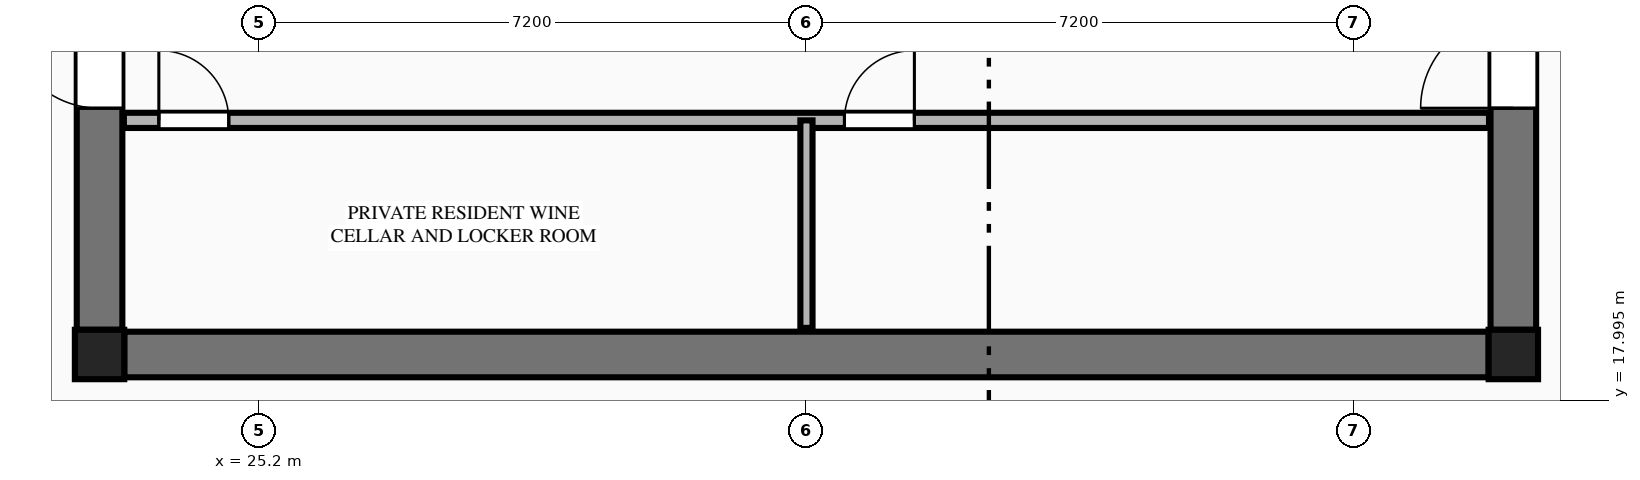
"""IFC4 building model, lengths in metres.
Left out: names, types, materials, properties, quantities, classifications, styles, units other than length and angle.
Written with IfcOpenShell. Run it as: python <this file> out.ifc"""

import sys

from ifc_helpers import new_model, si_unit, direction, frame, frame_2d, origin, origin_2d, place, context, subcontext, project, spatial, rectangle, extrude, element, fill, save


model = new_model("IFC4")
c1 = context("Model", 3, precision=1e-05, world=origin(), true_north=direction((0.0, 1.0)))
c2 = subcontext(c1, "Body", "Model", "MODEL_VIEW")
j1 = project(units=[si_unit("LENGTHUNIT", "METRE"), si_unit("PLANEANGLEUNIT", "RADIAN")], contexts=[c1])
p1 = place(None, origin())
s1 = spatial("IfcSite", under=j1, at=p1, CompositionType="ELEMENT")
p2 = place(p1, origin())
s2 = spatial("IfcBuilding", under=s1, at=p2, CompositionType="ELEMENT")
p3 = place(p2, frame((0.0, 0.0, 193.2)))
s3 = spatial("IfcBuildingStorey", under=s2, at=p3, CompositionType="ELEMENT", Elevation=193.2)
for number, where, z_axis, x_axis in (
    (1, (23.1, 18.6, 0.0), (0.0, 0.0, 1.0), (1.0, 0.0, 0.0)),
    (2, (41.7, 18.6, 0.0), (0.0, 0.0, 1.0), (1.0, 0.0, 0.0)),
):
    element("IfcColumn", number, at=place(p3, frame(where, z_axis=z_axis, x_axis=x_axis)), inside=s3, PredefinedType="COLUMN", context=c2, shape_type="SweptSolid", body=[
        extrude(rectangle(XDim=0.65, YDim=0.65, at=origin_2d()), origin(), (0.0, 0.0, 1.0), 3.55),
    ])
p4 = place(p3, frame((23.425, 18.6, 0.0), z_axis=(0.0, 0.0, 1.0), x_axis=(1.0, 0.0, 0.0)))
e3 = element("IfcWall", 3, at=p4, inside=s3, PredefinedType="SHEAR", context=c2, shape_type="SweptSolid", body=[
    extrude(rectangle(XDim=17.95, YDim=0.6, at=frame_2d((8.975, 0.0))), origin(), (0.0, 0.0, 1.0), 3.35),
])
p5 = place(p3, frame((23.1, 18.925, 0.0), z_axis=(0.0, 0.0, 1.0), x_axis=(0.0, 1.0, 0.0)))
e4 = element("IfcWall", 4, at=p5, inside=s3, PredefinedType="SHEAR", context=c2, shape_type="SweptSolid", body=[
    extrude(rectangle(XDim=13.95, YDim=0.6, at=frame_2d((6.975, 0.0))), origin(), (0.0, 0.0, 1.0), 3.35),
])
p6 = place(p5, frame((2.915, 0.0, 0.0)))
e5 = element("IfcOpeningElement", 5, at=p6, cuts=e4, PredefinedType="OPENING", context=c2, shape_type="SweptSolid", body=[
    extrude(rectangle(XDim=1.22, YDim=2.25, at=frame_2d((0.61, 1.125))), frame((0.0, 0.31, 0.0), z_axis=(0.0, -1.0, 0.0), x_axis=(1.0, 0.0, 0.0)), (0.0, 0.0, 1.0), 0.62),
])
p7 = place(p3, frame((41.7, 18.925, 0.0), z_axis=(0.0, 0.0, 1.0), x_axis=(0.0, 1.0, 0.0)))
e6 = element("IfcWall", 6, at=p7, inside=s3, PredefinedType="SHEAR", context=c2, shape_type="SweptSolid", body=[
    extrude(rectangle(XDim=13.95, YDim=0.6, at=frame_2d((6.975, 0.0))), origin(), (0.0, 0.0, 1.0), 3.35),
])
p8 = place(p7, frame((2.915, 0.0, 0.0)))
e7 = element("IfcOpeningElement", 7, at=p8, cuts=e6, PredefinedType="OPENING", context=c2, shape_type="SweptSolid", body=[
    extrude(rectangle(XDim=1.22, YDim=2.25, at=frame_2d((0.61, 1.125))), frame((0.0, 0.31, 0.0), z_axis=(0.0, -1.0, 0.0), x_axis=(1.0, 0.0, 0.0)), (0.0, 0.0, 1.0), 0.62),
])
p9 = place(p3, frame((23.42, 21.68, 0.0), z_axis=(0.0, 0.0, 1.0), x_axis=(1.0, 0.0, 0.0)))
e8 = element("IfcWall", 8, at=p9, inside=s3, PredefinedType="PLUMBINGWALL", context=c2, shape_type="SweptSolid", body=[
    extrude(rectangle(XDim=17.96, YDim=0.2, at=frame_2d((8.98, 0.0))), origin(), (0.0, 0.0, 1.0), 3.35),
])
p10 = place(p9, frame((0.46, 0.0, 0.0)))
e9 = element("IfcOpeningElement", 9, at=p10, cuts=e8, PredefinedType="OPENING", context=c2, shape_type="SweptSolid", body=[
    extrude(rectangle(XDim=0.92, YDim=2.15, at=frame_2d((0.46, 1.075))), frame((0.0, 0.11, 0.0), z_axis=(0.0, -1.0, 0.0), x_axis=(1.0, 0.0, 0.0)), (0.0, 0.0, 1.0), 0.22),
])
p11 = place(p9, frame((9.48, 0.0, 0.0)))
e10 = element("IfcOpeningElement", 10, at=p11, cuts=e8, PredefinedType="OPENING", context=c2, shape_type="SweptSolid", body=[
    extrude(rectangle(XDim=0.92, YDim=2.15, at=frame_2d((0.46, 1.075))), frame((0.0, 0.11, 0.0), z_axis=(0.0, -1.0, 0.0), x_axis=(1.0, 0.0, 0.0)), (0.0, 0.0, 1.0), 0.22),
])
p12 = place(p3, frame((32.4, 18.95, 0.0), z_axis=(0.0, 0.0, 1.0), x_axis=(0.0, 1.0, 0.0)))
e11 = element("IfcWall", 11, at=p12, inside=s3, PredefinedType="PARTITIONING", context=c2, shape_type="SweptSolid", body=[
    extrude(rectangle(XDim=2.73, YDim=0.16, at=frame_2d((1.365, 0.0))), origin(), (0.0, 0.0, 1.0), 3.35),
])
p13 = place(p6, origin())
e12 = element("IfcDoor", 12, at=p13, inside=s3, OperationType="SINGLE_SWING_RIGHT", PredefinedType="DOOR", context=c2, shape_type="SweptSolid", body=[
    extrude(rectangle(XDim=1.22, YDim=2.25, at=frame_2d((0.61, 1.125))), frame((0.0, 0.025, 0.0), z_axis=(0.0, -1.0, 0.0), x_axis=(1.0, 0.0, 0.0)), (0.0, 0.0, 1.0), 0.05),
])
fill(e5, e12)
p14 = place(p8, origin())
e13 = element("IfcDoor", 13, at=p14, inside=s3, OperationType="SINGLE_SWING_LEFT", PredefinedType="DOOR", context=c2, shape_type="SweptSolid", body=[
    extrude(rectangle(XDim=1.22, YDim=2.25, at=frame_2d((0.61, 1.125))), frame((0.0, 0.025, 0.0), z_axis=(0.0, -1.0, 0.0), x_axis=(1.0, 0.0, 0.0)), (0.0, 0.0, 1.0), 0.05),
])
fill(e7, e13)
p15 = place(p10, origin())
e14 = element("IfcDoor", 14, at=p15, inside=s3, OperationType="SINGLE_SWING_LEFT", PredefinedType="DOOR", context=c2, shape_type="SweptSolid", body=[
    extrude(rectangle(XDim=0.92, YDim=2.15, at=frame_2d((0.46, 1.075))), frame((0.0, 0.025, 0.0), z_axis=(0.0, -1.0, 0.0), x_axis=(1.0, 0.0, 0.0)), (0.0, 0.0, 1.0), 0.05),
])
fill(e9, e14)
p16 = place(p11, origin())
e15 = element("IfcDoor", 15, at=p16, inside=s3, OperationType="SINGLE_SWING_RIGHT", PredefinedType="DOOR", context=c2, shape_type="SweptSolid", body=[
    extrude(rectangle(XDim=0.92, YDim=2.15, at=frame_2d((0.46, 1.075))), frame((0.0, 0.025, 0.0), z_axis=(0.0, -1.0, 0.0), x_axis=(1.0, 0.0, 0.0)), (0.0, 0.0, 1.0), 0.05),
])
fill(e10, e15)
save(model, sys.argv[1])
